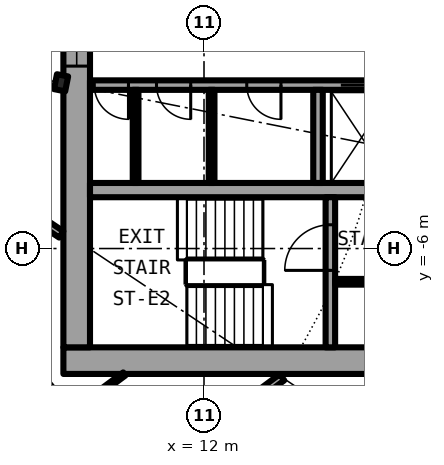
"""IFC4 building model, lengths in metres.
Left out: names, types, materials, properties, quantities, classifications, styles, units other than length and angle.
Written with IfcOpenShell. Run it as: python <this file> out.ifc"""

import sys

from ifc_helpers import new_model, si_unit, direction, frame, frame_2d, origin, origin_2d, place, context, subcontext, project, spatial, rectangle, i_section, extrude, element, fill, save


model = new_model("IFC4")
c1 = context("Model", 3, precision=1e-05, world=origin(), true_north=direction((0.0, 1.0)))
c2 = subcontext(c1, "Body", "Model", "MODEL_VIEW")
j1 = project(units=[si_unit("LENGTHUNIT", "METRE"), si_unit("PLANEANGLEUNIT", "RADIAN")], contexts=[c1])
p1 = place(None, origin())
s1 = spatial("IfcSite", under=j1, at=p1, CompositionType="ELEMENT")
p2 = place(p1, origin())
s2 = spatial("IfcBuilding", under=s1, at=p2, CompositionType="ELEMENT")
p3 = place(p2, frame((0.0, 0.0, 69.7)))
s3 = spatial("IfcBuildingStorey", under=s2, at=p3, CompositionType="ELEMENT", Elevation=69.7)
p4 = place(p3, frame((8.239, -1.639, 0.0), z_axis=(0.0, 0.0, 1.0), x_axis=(0.980785280403, -0.195090322016, 0.0)))
e1 = element("IfcColumn", 1, at=p4, inside=s3, PredefinedType="COLUMN", context=c2, shape_type="SweptSolid", body=[
    extrude(i_section(OverallWidth=0.3, OverallDepth=0.4, WebThickness=0.013, FlangeThickness=0.024, FilletRadius=0.027, at=origin_2d()), origin(), (0.0, 0.0, 1.0), 3.05),
])
p5 = place(p3, frame((8.3, -8.95, 0.0), z_axis=(0.0, 0.0, 1.0), x_axis=(1.0, 0.0, 0.0)))
e2 = element("IfcWall", 2, at=p5, inside=s3, PredefinedType="SHEAR", context=c2, shape_type="SweptSolid", body=[
    extrude(rectangle(XDim=14.0, YDim=0.7, at=frame_2d((7.0, 0.0))), origin(), (0.0, 0.0, 1.0), 3.05),
])
p6 = place(p5, frame((11.575, 0.0, 0.0)))
e3 = element("IfcOpeningElement", 3, at=p6, cuts=e2, PredefinedType="OPENING", context=c2, shape_type="SweptSolid", body=[
    extrude(rectangle(XDim=1.2, YDim=2.3, at=frame_2d((0.6, 1.15))), frame((0.0, 0.36, 0.0), z_axis=(0.0, -1.0, 0.0), x_axis=(1.0, 0.0, 0.0)), (0.0, 0.0, 1.0), 0.72),
])
p7 = place(p3, frame((8.65, -8.6, 0.0), z_axis=(0.0, 0.0, 1.0), x_axis=(0.0, 1.0, 0.0)))
e4 = element("IfcWall", 4, at=p7, inside=s3, PredefinedType="SHEAR", context=c2, shape_type="SweptSolid", body=[
    extrude(rectangle(XDim=17.2, YDim=0.7, at=frame_2d((8.6, 0.0))), origin(), (0.0, 0.0, 1.0), 3.05),
])
p8 = place(p7, frame((7.4, 0.0, 0.1)))
e5 = element("IfcOpeningElement", 5, at=p8, cuts=e4, PredefinedType="OPENING", context=c2, shape_type="SweptSolid", body=[
    extrude(rectangle(XDim=2.4, YDim=2.2, at=frame_2d((1.2, 1.1))), frame((0.0, 0.36, 0.0), z_axis=(0.0, -1.0, 0.0), x_axis=(1.0, 0.0, 0.0)), (0.0, 0.0, 1.0), 0.72),
])
p9 = place(p3, frame((19.15, -1.7, 0.0), z_axis=(0.0, 0.0, 1.0), x_axis=(-1.0, 0.0, 0.0)))
e6 = element("IfcWall", 6, at=p9, inside=s3, PredefinedType="SHEAR", context=c2, shape_type="SweptSolid", body=[
    extrude(rectangle(XDim=10.15, YDim=0.25, at=frame_2d((5.075, 0.0))), origin(), (0.0, 0.0, 1.0), 3.05),
])
p10 = place(p9, frame((2.45, 0.0, 0.0)))
e7 = element("IfcOpeningElement", 7, at=p10, cuts=e6, PredefinedType="OPENING", context=c2, shape_type="SweptSolid", body=[
    extrude(rectangle(XDim=1.1, YDim=2.3, at=frame_2d((0.55, 1.15))), frame((0.0, 0.135, 0.0), z_axis=(0.0, -1.0, 0.0), x_axis=(1.0, 0.0, 0.0)), (0.0, 0.0, 1.0), 0.27),
])
p11 = place(p9, frame((9.137, 0.0, 0.0)))
e8 = element("IfcOpeningElement", 8, at=p11, cuts=e6, PredefinedType="OPENING", context=c2, shape_type="SweptSolid", body=[
    extrude(rectangle(XDim=0.9, YDim=2.3, at=frame_2d((0.45, 1.15))), frame((0.0, 0.135, 0.0), z_axis=(0.0, -1.0, 0.0), x_axis=(1.0, 0.0, 0.0)), (0.0, 0.0, 1.0), 0.27),
])
p12 = place(p9, frame((7.5, 0.0, 0.0)))
e9 = element("IfcOpeningElement", 9, at=p12, cuts=e6, PredefinedType="OPENING", context=c2, shape_type="SweptSolid", body=[
    extrude(rectangle(XDim=0.9, YDim=2.3, at=frame_2d((0.45, 1.15))), frame((0.0, 0.135, 0.0), z_axis=(0.0, -1.0, 0.0), x_axis=(1.0, 0.0, 0.0)), (0.0, 0.0, 1.0), 0.27),
])
p13 = place(p9, frame((5.125, 0.0, 0.0)))
e10 = element("IfcOpeningElement", 10, at=p13, cuts=e6, PredefinedType="OPENING", context=c2, shape_type="SweptSolid", body=[
    extrude(rectangle(XDim=0.9, YDim=2.3, at=frame_2d((0.45, 1.15))), frame((0.0, 0.135, 0.0), z_axis=(0.0, -1.0, 0.0), x_axis=(1.0, 0.0, 0.0)), (0.0, 0.0, 1.0), 0.27),
])
p14 = place(p9, frame((0.413, 0.0, 0.0)))
e11 = element("IfcOpeningElement", 11, at=p14, cuts=e6, PredefinedType="OPENING", context=c2, shape_type="SweptSolid", body=[
    extrude(rectangle(XDim=0.9, YDim=2.3, at=frame_2d((0.45, 1.15))), frame((0.0, 0.135, 0.0), z_axis=(0.0, -1.0, 0.0), x_axis=(1.0, 0.0, 0.0)), (0.0, 0.0, 1.0), 0.27),
])
p15 = place(p3, frame((9.0, -4.462, 0.0), z_axis=(0.0, 0.0, 1.0), x_axis=(1.0, 0.0, 0.0)))
e12 = element("IfcWall", 12, at=p15, inside=s3, PredefinedType="SHEAR", context=c2, shape_type="SweptSolid", body=[
    extrude(rectangle(XDim=10.15, YDim=0.375, at=frame_2d((5.075, 0.0))), origin(), (0.0, 0.0, 1.0), 3.05),
])
p16 = place(p3, frame((15.325, -8.6, 0.0), z_axis=(0.0, 0.0, 1.0), x_axis=(0.0, 1.0, 0.0)))
e13 = element("IfcWall", 13, at=p16, inside=s3, PredefinedType="SHEAR", context=c2, shape_type="SweptSolid", body=[
    extrude(rectangle(XDim=3.95, YDim=0.25, at=frame_2d((1.975, 0.0))), origin(), (0.0, 0.0, 1.0), 3.05),
])
p17 = place(p16, frame((2.025, 0.0, 0.0)))
e14 = element("IfcOpeningElement", 14, at=p17, cuts=e13, PredefinedType="OPENING", context=c2, shape_type="SweptSolid", body=[
    extrude(rectangle(XDim=1.2, YDim=2.3, at=frame_2d((0.6, 1.15))), frame((0.0, 0.135, 0.0), z_axis=(0.0, -1.0, 0.0), x_axis=(1.0, 0.0, 0.0)), (0.0, 0.0, 1.0), 0.27),
])
p18 = place(p3, frame((15.0, -1.825, 0.0), z_axis=(0.0, 0.0, 1.0), x_axis=(0.0, -1.0, 0.0)))
e15 = element("IfcWall", 15, at=p18, inside=s3, PredefinedType="SOLIDWALL", context=c2, shape_type="SweptSolid", body=[
    extrude(rectangle(XDim=2.45, YDim=0.25, at=frame_2d((1.225, 0.0))), origin(), (0.0, 0.0, 1.0), 2.7),
])
for number, where, z_axis, x_axis in (
    (16, (10.2, -1.825, 0.0), (0.0, 0.0, 1.0), (0.0, -1.0, 0.0)),
    (17, (12.2, -1.825, 0.0), (0.0, 0.0, 1.0), (0.0, -1.0, 0.0)),
):
    element("IfcWall", number, at=place(p3, frame(where, z_axis=z_axis, x_axis=x_axis)), inside=s3, PredefinedType="PARTITIONING", context=c2, shape_type="SweptSolid", body=[
        extrude(rectangle(XDim=2.45, YDim=0.15, at=frame_2d((1.225, 0.0))), origin(), (0.0, 0.0, 1.0), 2.7),
    ])
p19 = place(p3, frame((15.45, -6.875, 0.0), z_axis=(0.0, 0.0, 1.0), x_axis=(1.0, 0.0, 0.0)))
e18 = element("IfcWall", 18, at=p19, inside=s3, PredefinedType="PARTITIONING", context=c2, shape_type="SweptSolid", body=[
    extrude(rectangle(XDim=3.7, YDim=0.15, at=frame_2d((1.85, 0.0))), origin(), (0.0, 0.0, 1.0), 2.7),
])
p20 = place(p19, frame((1.4, 0.0, 0.0)))
e19 = element("IfcOpeningElement", 19, at=p20, cuts=e18, PredefinedType="OPENING", context=c2, shape_type="SweptSolid", body=[
    extrude(rectangle(XDim=0.9, YDim=2.3, at=frame_2d((0.45, 1.15))), frame((0.0, 0.085, 0.0), z_axis=(0.0, -1.0, 0.0), x_axis=(1.0, 0.0, 0.0)), (0.0, 0.0, 1.0), 0.17),
])
p21 = place(p3, frame((4.906, -16.172, 0.0), z_axis=(0.0, 0.0, 1.0), x_axis=(0.803204584823, 0.59570327758, 0.0)))
e20 = element("IfcWall", 20, at=p21, inside=s3, PredefinedType="PARTITIONING", context=c2, shape_type="SweptSolid", body=[
    extrude(rectangle(XDim=11.387, YDim=0.2, at=frame_2d((5.693, 0.0))), origin(), (0.0, 0.0, 1.0), 2.7),
])
p22 = place(p21, frame((4.38, 0.0, 0.0)))
e21 = element("IfcOpeningElement", 21, at=p22, cuts=e20, PredefinedType="OPENING", context=c2, shape_type="SweptSolid", body=[
    extrude(rectangle(XDim=1.0, YDim=2.3, at=frame_2d((0.5, 1.15))), frame((0.0, 0.11, 0.0), z_axis=(0.0, -1.0, 0.0), x_axis=(1.0, 0.0, 0.0)), (0.0, 0.0, 1.0), 0.22),
])
p23 = place(p3, frame((8.513, -10.332, 0.0), z_axis=(0.0, 0.0, 1.0), x_axis=(0.803135014325, 0.595797070121, 0.0)))
e22 = element("IfcWall", 22, at=p23, inside=s3, PredefinedType="PARTITIONING", context=c2, shape_type="SweptSolid", body=[
    extrude(rectangle(XDim=1.732, YDim=0.1, at=frame_2d((0.866, 0.0))), origin(), (0.0, 0.0, 1.0), 2.7),
])
p24 = place(p3, frame((6.513, -4.472, 0.0), z_axis=(0.0, 0.0, 1.0), x_axis=(0.831382204863, -0.555701025225, 0.0)))
e23 = element("IfcWall", 23, at=p24, inside=s3, PredefinedType="PARTITIONING", context=c2, shape_type="SweptSolid", body=[
    extrude(rectangle(XDim=2.082, YDim=0.2, at=frame_2d((1.041, 0.0))), origin(), (0.0, 0.0, 1.0), 2.7),
])
p25 = place(p3, frame((4.908, -5.959, 0.0), z_axis=(0.0, 0.0, 1.0), x_axis=(0.636105207978, -0.771602335652, 0.0)))
e24 = element("IfcWall", 24, at=p25, inside=s3, PredefinedType="PARTITIONING", context=c2, shape_type="SweptSolid", body=[
    extrude(rectangle(XDim=8.213, YDim=0.1, at=frame_2d((4.106, 0.0))), origin(), (0.0, 0.0, 1.0), 2.7),
])
p26 = place(p25, frame((6.49, 0.0, 0.0)))
e25 = element("IfcOpeningElement", 25, at=p26, cuts=e24, PredefinedType="OPENING", context=c2, shape_type="SweptSolid", body=[
    extrude(rectangle(XDim=0.9, YDim=2.3, at=frame_2d((0.45, 1.15))), frame((0.0, 0.06, 0.0), z_axis=(0.0, -1.0, 0.0), x_axis=(1.0, 0.0, 0.0)), (0.0, 0.0, 1.0), 0.12),
])
p27 = place(p25, frame((2.384, 0.0, 0.0)))
e26 = element("IfcOpeningElement", 26, at=p27, cuts=e24, PredefinedType="OPENING", context=c2, shape_type="SweptSolid", body=[
    extrude(rectangle(XDim=0.9, YDim=2.3, at=frame_2d((0.45, 1.15))), frame((0.0, 0.06, 0.0), z_axis=(0.0, -1.0, 0.0), x_axis=(1.0, 0.0, 0.0)), (0.0, 0.0, 1.0), 0.12),
])
p28 = place(p10, origin())
e27 = element("IfcDoor", 27, at=p28, inside=s3, OperationType="DOUBLE_DOOR_SLIDING", PredefinedType="DOOR", context=c2, shape_type="SweptSolid", body=[
    extrude(rectangle(XDim=1.1, YDim=2.3, at=frame_2d((0.55, 1.15))), frame((0.0, 0.025, 0.0), z_axis=(0.0, -1.0, 0.0), x_axis=(1.0, 0.0, 0.0)), (0.0, 0.0, 1.0), 0.05),
])
fill(e7, e27)
p29 = place(p11, origin())
e28 = element("IfcDoor", 28, at=p29, inside=s3, OperationType="SINGLE_SWING_LEFT", PredefinedType="DOOR", context=c2, shape_type="SweptSolid", body=[
    extrude(rectangle(XDim=0.9, YDim=2.3, at=frame_2d((0.45, 1.15))), frame((0.0, 0.025, 0.0), z_axis=(0.0, -1.0, 0.0), x_axis=(1.0, 0.0, 0.0)), (0.0, 0.0, 1.0), 0.05),
])
fill(e8, e28)
p30 = place(p12, origin())
e29 = element("IfcDoor", 29, at=p30, inside=s3, OperationType="SINGLE_SWING_LEFT", PredefinedType="DOOR", context=c2, shape_type="SweptSolid", body=[
    extrude(rectangle(XDim=0.9, YDim=2.3, at=frame_2d((0.45, 1.15))), frame((0.0, 0.025, 0.0), z_axis=(0.0, -1.0, 0.0), x_axis=(1.0, 0.0, 0.0)), (0.0, 0.0, 1.0), 0.05),
])
fill(e9, e29)
p31 = place(p13, origin())
e30 = element("IfcDoor", 30, at=p31, inside=s3, OperationType="SINGLE_SWING_LEFT", PredefinedType="DOOR", context=c2, shape_type="SweptSolid", body=[
    extrude(rectangle(XDim=0.9, YDim=2.3, at=frame_2d((0.45, 1.15))), frame((0.0, 0.025, 0.0), z_axis=(0.0, -1.0, 0.0), x_axis=(1.0, 0.0, 0.0)), (0.0, 0.0, 1.0), 0.05),
])
fill(e10, e30)
p32 = place(p17, origin())
e31 = element("IfcDoor", 31, at=p32, inside=s3, OperationType="SINGLE_SWING_LEFT", PredefinedType="DOOR", context=c2, shape_type="SweptSolid", body=[
    extrude(rectangle(XDim=1.2, YDim=2.3, at=frame_2d((0.6, 1.15))), frame((0.0, 0.025, 0.0), z_axis=(0.0, -1.0, 0.0), x_axis=(1.0, 0.0, 0.0)), (0.0, 0.0, 1.0), 0.05),
])
fill(e14, e31)
p33 = place(p8, origin())
e32 = element("IfcWindow", 32, at=p33, inside=s3, PartitioningType="SINGLE_PANEL", PredefinedType="WINDOW", context=c2, shape_type="SweptSolid", body=[
    extrude(rectangle(XDim=2.4, YDim=2.2, at=frame_2d((1.2, 1.1))), frame((0.0, 0.03, 0.0), z_axis=(0.0, -1.0, 0.0), x_axis=(1.0, 0.0, 0.0)), (0.0, 0.0, 1.0), 0.06),
])
fill(e5, e32)
save(model, sys.argv[1])
